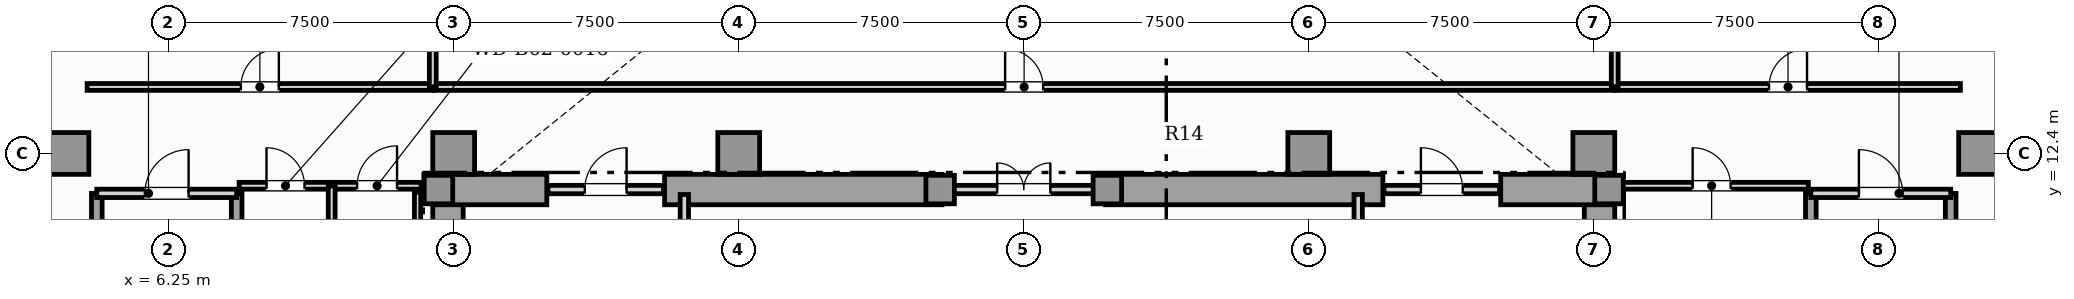
"""IFC4 building model, lengths in metres.
Left out: names, types, materials, properties, quantities, classifications, styles, units other than length and angle.
Written with IfcOpenShell. Run it as: python <this file> out.ifc"""

import sys

from ifc_helpers import new_model, si_unit, direction, frame, frame_2d, origin, origin_2d, place, context, subcontext, project, spatial, rectangle, extrude, element, fill, save


model = new_model("IFC4")
c1 = context("Model", 3, precision=1e-05, world=origin(), true_north=direction((0.0, 1.0)))
c2 = subcontext(c1, "Body", "Model", "MODEL_VIEW")
j1 = project(units=[si_unit("LENGTHUNIT", "METRE"), si_unit("PLANEANGLEUNIT", "RADIAN")], contexts=[c1])
p1 = place(None, origin())
s1 = spatial("IfcSite", under=j1, at=p1, CompositionType="ELEMENT")
p2 = place(p1, origin())
s2 = spatial("IfcBuilding", under=s1, at=p2, CompositionType="ELEMENT")
p3 = place(p2, frame((0.0, 0.0, -10.8)))
s3 = spatial("IfcBuildingStorey", under=s2, at=p3, CompositionType="ELEMENT", Elevation=-10.8)
for number, where, z_axis, x_axis in (
    (1, (13.6, 0.92, 0.0), (0.0, 0.0, 1.0), (0.0, 1.0, 0.0)),
    (2, (43.9, 0.92, 0.0), (0.0, 0.0, 1.0), (0.0, 1.0, 0.0)),
):
    element("IfcWall", number, at=place(p3, frame(where, z_axis=z_axis, x_axis=x_axis)), inside=s3, PredefinedType="SHEAR", context=c2, shape_type="SweptSolid", body=[
        extrude(rectangle(XDim=10.53, YDim=0.8, at=frame_2d((5.265, 0.0))), origin(), (0.0, 0.0, 1.0), 5.05),
    ])
p4 = place(p3, frame((13.25, 11.45, 0.0), z_axis=(0.0, 0.0, 1.0), x_axis=(1.0, 0.0, 0.0)))
e3 = element("IfcWall", 3, at=p4, inside=s3, PredefinedType="SHEAR", context=c2, shape_type="SweptSolid", body=[
    extrude(rectangle(XDim=2.95, YDim=0.8, at=frame_2d((1.475, 0.0))), origin(), (0.0, 0.0, 1.0), 5.05),
])
for number, where, z_axis, x_axis in (
    (4, (19.3, 11.45, 0.0), (0.0, 0.0, 1.0), (1.0, 0.0, 0.0)),
    (5, (30.9, 11.45, 0.0), (0.0, 0.0, 1.0), (1.0, 0.0, 0.0)),
):
    element("IfcWall", number, at=place(p3, frame(where, z_axis=z_axis, x_axis=x_axis)), inside=s3, PredefinedType="SHEAR", context=c2, shape_type="SweptSolid", body=[
        extrude(rectangle(XDim=7.3, YDim=0.8, at=frame_2d((3.65, 0.0))), origin(), (0.0, 0.0, 1.0), 5.05),
    ])
p5 = place(p3, frame((41.3, 11.45, 0.0), z_axis=(0.0, 0.0, 1.0), x_axis=(1.0, 0.0, 0.0)))
e6 = element("IfcWall", 6, at=p5, inside=s3, PredefinedType="SHEAR", context=c2, shape_type="SweptSolid", body=[
    extrude(rectangle(XDim=2.95, YDim=0.8, at=frame_2d((1.475, 0.0))), origin(), (0.0, 0.0, 1.0), 5.05),
])
for number, where, z_axis, x_axis in (
    (7, (13.35, 11.45, 0.0), (0.0, 0.0, 1.0), (1.0, 0.0, 0.0)),
    (8, (44.15, 11.45, 0.0), (0.0, 0.0, 1.0), (1.0, 0.0, 0.0)),
    (9, (26.55, 11.45, 0.0), (0.0, 0.0, 1.0), (1.0, 0.0, 0.0)),
    (10, (30.95, 11.45, 0.0), (0.0, 0.0, 1.0), (1.0, 0.0, 0.0)),
):
    element("IfcColumn", number, at=place(p3, frame(where, z_axis=z_axis, x_axis=x_axis)), inside=s3, PredefinedType="COLUMN", context=c2, shape_type="SweptSolid", body=[
        extrude(rectangle(XDim=0.75, YDim=0.75, at=origin_2d()), origin(), (0.0, 0.0, 1.0), 5.4),
    ])
for number, where, z_axis, x_axis in (
    (11, (3.6, 12.4, 0.0), (0.0, 0.0, 1.0), (1.0, 0.0, 0.0)),
    (12, (13.75, 12.4, 0.0), (0.0, 0.0, 1.0), (1.0, 0.0, 0.0)),
    (13, (43.75, 12.4, 0.0), (0.0, 0.0, 1.0), (1.0, 0.0, 0.0)),
    (14, (53.9, 12.4, 0.0), (0.0, 0.0, 1.0), (1.0, 0.0, 0.0)),
    (15, (21.25, 12.4, 0.0), (0.0, 0.0, 1.0), (1.0, 0.0, 0.0)),
    (16, (36.25, 12.4, 0.0), (0.0, 0.0, 1.0), (1.0, 0.0, 0.0)),
):
    element("IfcColumn", number, at=place(p3, frame(where, z_axis=z_axis, x_axis=x_axis)), inside=s3, PredefinedType="COLUMN", context=c2, shape_type="SweptSolid", body=[
        extrude(rectangle(XDim=1.1, YDim=1.1, at=origin_2d()), origin(), (0.0, 0.0, 1.0), 5.4),
    ])
for number, where, z_axis, x_axis in (
    (17, (4.36, 3.56, 0.0), (0.0, 0.0, 1.0), (0.0, 1.0, 0.0)),
    (18, (8.04, 3.56, 0.0), (0.0, 0.0, 1.0), (0.0, 1.0, 0.0)),
):
    element("IfcWall", number, at=place(p3, frame(where, z_axis=z_axis, x_axis=x_axis)), inside=s3, PredefinedType="SHEAR", context=c2, shape_type="SweptSolid", body=[
        extrude(rectangle(XDim=7.79, YDim=0.28, at=frame_2d((3.895, 0.0))), origin(), (0.0, 0.0, 1.0), 5.05),
    ])
p6 = place(p3, frame((4.36, 11.35, 0.0), z_axis=(0.0, 0.0, 1.0), x_axis=(1.0, 0.0, 0.0)))
e19 = element("IfcWall", 19, at=p6, inside=s3, PredefinedType="SOLIDWALL", context=c2, shape_type="SweptSolid", body=[
    extrude(rectangle(XDim=3.68, YDim=0.22, at=frame_2d((1.84, 0.0))), origin(), (0.0, 0.0, 1.0), 5.05),
])
p7 = place(p6, frame((1.265, 0.0, 0.0)))
e20 = element("IfcOpeningElement", 20, at=p7, cuts=e19, PredefinedType="OPENING", context=c2, shape_type="SweptSolid", body=[
    extrude(rectangle(XDim=1.15, YDim=2.2, at=frame_2d((0.575, 1.1))), frame((0.0, 0.12, 0.0), z_axis=(0.0, -1.0, 0.0), x_axis=(1.0, 0.0, 0.0)), (0.0, 0.0, 1.0), 0.24),
])
for number, where, z_axis, x_axis in (
    (21, (49.46, 3.56, 0.0), (0.0, 0.0, 1.0), (0.0, 1.0, 0.0)),
    (22, (53.14, 3.56, 0.0), (0.0, 0.0, 1.0), (0.0, 1.0, 0.0)),
):
    element("IfcWall", number, at=place(p3, frame(where, z_axis=z_axis, x_axis=x_axis)), inside=s3, PredefinedType="SHEAR", context=c2, shape_type="SweptSolid", body=[
        extrude(rectangle(XDim=7.79, YDim=0.28, at=frame_2d((3.895, 0.0))), origin(), (0.0, 0.0, 1.0), 5.05),
    ])
p8 = place(p3, frame((49.46, 11.35, 0.0), z_axis=(0.0, 0.0, 1.0), x_axis=(1.0, 0.0, 0.0)))
e23 = element("IfcWall", 23, at=p8, inside=s3, PredefinedType="SOLIDWALL", context=c2, shape_type="SweptSolid", body=[
    extrude(rectangle(XDim=3.68, YDim=0.22, at=frame_2d((1.84, 0.0))), origin(), (0.0, 0.0, 1.0), 5.05),
])
p9 = place(p8, frame((1.265, 0.0, 0.0)))
e24 = element("IfcOpeningElement", 24, at=p9, cuts=e23, PredefinedType="OPENING", context=c2, shape_type="SweptSolid", body=[
    extrude(rectangle(XDim=1.15, YDim=2.2, at=frame_2d((0.575, 1.1))), frame((0.0, 0.12, 0.0), z_axis=(0.0, -1.0, 0.0), x_axis=(1.0, 0.0, 0.0)), (0.0, 0.0, 1.0), 0.24),
])
p10 = place(p3, frame((19.82, 8.52, 0.0), z_axis=(0.0, 0.0, 1.0), x_axis=(0.0, 1.0, 0.0)))
e25 = element("IfcWall", 25, at=p10, inside=s3, PredefinedType="SOLIDWALL", context=c2, shape_type="SweptSolid", body=[
    extrude(rectangle(XDim=2.8, YDim=0.22, at=frame_2d((1.4, 0.0))), origin(), (0.0, 0.0, 1.0), 4.506),
])
p11 = place(p10, frame((0.85, 0.0, 0.0)))
e26 = element("IfcOpeningElement", 26, at=p11, cuts=e25, PredefinedType="OPENING", context=c2, shape_type="SweptSolid", body=[
    extrude(rectangle(XDim=1.1, YDim=2.2, at=frame_2d((0.55, 1.1))), frame((0.0, 0.12, 0.0), z_axis=(0.0, -1.0, 0.0), x_axis=(1.0, 0.0, 0.0)), (0.0, 0.0, 1.0), 0.24),
])
p12 = place(p3, frame((37.55, 8.52, 0.0), z_axis=(0.0, 0.0, 1.0), x_axis=(0.0, 1.0, 0.0)))
e27 = element("IfcWall", 27, at=p12, inside=s3, PredefinedType="SOLIDWALL", context=c2, shape_type="SweptSolid", body=[
    extrude(rectangle(XDim=2.8, YDim=0.22, at=frame_2d((1.4, 0.0))), origin(), (0.0, 0.0, 1.0), 4.506),
])
p13 = place(p12, frame((0.85, 0.0, 0.0)))
e28 = element("IfcOpeningElement", 28, at=p13, cuts=e27, PredefinedType="OPENING", context=c2, shape_type="SweptSolid", body=[
    extrude(rectangle(XDim=1.1, YDim=2.2, at=frame_2d((0.55, 1.1))), frame((0.0, 0.12, 0.0), z_axis=(0.0, -1.0, 0.0), x_axis=(1.0, 0.0, 0.0)), (0.0, 0.0, 1.0), 0.24),
])
p14 = place(p3, frame((16.23, 11.45, 0.0), z_axis=(0.0, 0.0, 1.0), x_axis=(1.0, 0.0, 0.0)))
e29 = element("IfcWall", 29, at=p14, inside=s3, PredefinedType="SOLIDWALL", context=c2, shape_type="SweptSolid", body=[
    extrude(rectangle(XDim=3.04, YDim=0.22, at=frame_2d((1.52, 0.0))), origin(), (0.0, 0.0, 1.0), 5.05),
])
p15 = place(p14, frame((0.97, 0.0, 0.0)))
e30 = element("IfcOpeningElement", 30, at=p15, cuts=e29, PredefinedType="OPENING", context=c2, shape_type="SweptSolid", body=[
    extrude(rectangle(XDim=1.1, YDim=2.2, at=frame_2d((0.55, 1.1))), frame((0.0, 0.12, 0.0), z_axis=(0.0, -1.0, 0.0), x_axis=(1.0, 0.0, 0.0)), (0.0, 0.0, 1.0), 0.24),
])
p16 = place(p3, frame((26.63, 11.45, 0.0), z_axis=(0.0, 0.0, 1.0), x_axis=(1.0, 0.0, 0.0)))
e31 = element("IfcWall", 31, at=p16, inside=s3, PredefinedType="SOLIDWALL", context=c2, shape_type="SweptSolid", body=[
    extrude(rectangle(XDim=4.24, YDim=0.22, at=frame_2d((2.12, 0.0))), origin(), (0.0, 0.0, 1.0), 5.05),
])
p17 = place(p16, frame((1.42, 0.0, 0.0)))
e32 = element("IfcOpeningElement", 32, at=p17, cuts=e31, PredefinedType="OPENING", context=c2, shape_type="SweptSolid", body=[
    extrude(rectangle(XDim=1.4, YDim=2.2, at=frame_2d((0.7, 1.1))), frame((0.0, 0.12, 0.0), z_axis=(0.0, -1.0, 0.0), x_axis=(1.0, 0.0, 0.0)), (0.0, 0.0, 1.0), 0.24),
])
p18 = place(p3, frame((38.23, 11.45, 0.0), z_axis=(0.0, 0.0, 1.0), x_axis=(1.0, 0.0, 0.0)))
e33 = element("IfcWall", 33, at=p18, inside=s3, PredefinedType="SOLIDWALL", context=c2, shape_type="SweptSolid", body=[
    extrude(rectangle(XDim=3.04, YDim=0.22, at=frame_2d((1.52, 0.0))), origin(), (0.0, 0.0, 1.0), 5.05),
])
p19 = place(p18, frame((0.97, 0.0, 0.0)))
e34 = element("IfcOpeningElement", 34, at=p19, cuts=e33, PredefinedType="OPENING", context=c2, shape_type="SweptSolid", body=[
    extrude(rectangle(XDim=1.1, YDim=2.2, at=frame_2d((0.55, 1.1))), frame((0.0, 0.12, 0.0), z_axis=(0.0, -1.0, 0.0), x_axis=(1.0, 0.0, 0.0)), (0.0, 0.0, 1.0), 0.24),
])
p20 = place(p3, frame((4.105, 14.15, 0.0), z_axis=(0.0, 0.0, 1.0), x_axis=(1.0, 0.0, 0.0)))
e35 = element("IfcWall", 35, at=p20, inside=s3, PredefinedType="PARTITIONING", context=c2, shape_type="SweptSolid", body=[
    extrude(rectangle(XDim=9.09, YDim=0.18, at=frame_2d((4.545, 0.0))), origin(), (0.0, 0.0, 1.0), 5.05),
])
p21 = place(p20, frame((4.045, 0.0, 0.0)))
e36 = element("IfcOpeningElement", 36, at=p21, cuts=e35, PredefinedType="OPENING", context=c2, shape_type="SweptSolid", body=[
    extrude(rectangle(XDim=1.0, YDim=2.15, at=frame_2d((0.5, 1.075))), frame((0.0, 0.1, 0.0), z_axis=(0.0, -1.0, 0.0), x_axis=(1.0, 0.0, 0.0)), (0.0, 0.0, 1.0), 0.2),
])
p22 = place(p3, frame((13.225, 14.15, 0.0), z_axis=(0.0, 0.0, 1.0), x_axis=(1.0, 0.0, 0.0)))
e37 = element("IfcWall", 37, at=p22, inside=s3, PredefinedType="PARTITIONING", context=c2, shape_type="SweptSolid", body=[
    extrude(rectangle(XDim=31.07, YDim=0.18, at=frame_2d((15.535, 0.0))), origin(), (0.0, 0.0, 1.0), 5.05),
])
p23 = place(p22, frame((15.035, 0.0, 0.0)))
e38 = element("IfcOpeningElement", 38, at=p23, cuts=e37, PredefinedType="OPENING", context=c2, shape_type="SweptSolid", body=[
    extrude(rectangle(XDim=1.0, YDim=2.15, at=frame_2d((0.5, 1.075))), frame((0.0, 0.1, 0.0), z_axis=(0.0, -1.0, 0.0), x_axis=(1.0, 0.0, 0.0)), (0.0, 0.0, 1.0), 0.2),
])
p24 = place(p3, frame((44.325, 14.15, 0.0), z_axis=(0.0, 0.0, 1.0), x_axis=(1.0, 0.0, 0.0)))
e39 = element("IfcWall", 39, at=p24, inside=s3, PredefinedType="PARTITIONING", context=c2, shape_type="SweptSolid", body=[
    extrude(rectangle(XDim=9.07, YDim=0.18, at=frame_2d((4.535, 0.0))), origin(), (0.0, 0.0, 1.0), 5.05),
])
p25 = place(p24, frame((4.035, 0.0, 0.0)))
e40 = element("IfcOpeningElement", 40, at=p25, cuts=e39, PredefinedType="OPENING", context=c2, shape_type="SweptSolid", body=[
    extrude(rectangle(XDim=1.0, YDim=2.15, at=frame_2d((0.5, 1.075))), frame((0.0, 0.1, 0.0), z_axis=(0.0, -1.0, 0.0), x_axis=(1.0, 0.0, 0.0)), (0.0, 0.0, 1.0), 0.2),
])
p26 = place(p3, frame((8.105, 11.55, 0.0), z_axis=(0.0, 0.0, 1.0), x_axis=(1.0, 0.0, 0.0)))
e41 = element("IfcWall", 41, at=p26, inside=s3, PredefinedType="PARTITIONING", context=c2, shape_type="SweptSolid", body=[
    extrude(rectangle(XDim=2.44, YDim=0.18, at=frame_2d((1.22, 0.0))), origin(), (0.0, 0.0, 1.0), 5.05),
])
p27 = place(p26, frame((0.72, 0.0, 0.0)))
e42 = element("IfcOpeningElement", 42, at=p27, cuts=e41, PredefinedType="OPENING", context=c2, shape_type="SweptSolid", body=[
    extrude(rectangle(XDim=1.0, YDim=2.15, at=frame_2d((0.5, 1.075))), frame((0.0, 0.1, 0.0), z_axis=(0.0, -1.0, 0.0), x_axis=(1.0, 0.0, 0.0)), (0.0, 0.0, 1.0), 0.2),
])
p28 = place(p3, frame((10.575, 11.55, 0.0), z_axis=(0.0, 0.0, 1.0), x_axis=(1.0, 0.0, 0.0)))
e43 = element("IfcWall", 43, at=p28, inside=s3, PredefinedType="PARTITIONING", context=c2, shape_type="SweptSolid", body=[
    extrude(rectangle(XDim=2.32, YDim=0.18, at=frame_2d((1.16, 0.0))), origin(), (0.0, 0.0, 1.0), 5.05),
])
p29 = place(p28, frame((0.635, 0.0, 0.0)))
e44 = element("IfcOpeningElement", 44, at=p29, cuts=e43, PredefinedType="OPENING", context=c2, shape_type="SweptSolid", body=[
    extrude(rectangle(XDim=1.05, YDim=2.15, at=frame_2d((0.525, 1.075))), frame((0.0, 0.1, 0.0), z_axis=(0.0, -1.0, 0.0), x_axis=(1.0, 0.0, 0.0)), (0.0, 0.0, 1.0), 0.2),
])
p30 = place(p3, frame((44.305, 11.55, 0.0), z_axis=(0.0, 0.0, 1.0), x_axis=(1.0, 0.0, 0.0)))
e45 = element("IfcWall", 45, at=p30, inside=s3, PredefinedType="PARTITIONING", context=c2, shape_type="SweptSolid", body=[
    extrude(rectangle(XDim=5.09, YDim=0.18, at=frame_2d((2.545, 0.0))), origin(), (0.0, 0.0, 1.0), 5.05),
])
p31 = place(p30, frame((2.045, 0.0, 0.0)))
e46 = element("IfcOpeningElement", 46, at=p31, cuts=e45, PredefinedType="OPENING", context=c2, shape_type="SweptSolid", body=[
    extrude(rectangle(XDim=1.0, YDim=2.15, at=frame_2d((0.5, 1.075))), frame((0.0, 0.1, 0.0), z_axis=(0.0, -1.0, 0.0), x_axis=(1.0, 0.0, 0.0)), (0.0, 0.0, 1.0), 0.2),
])
p32 = place(p3, frame((13.2, 14.155, 0.0), z_axis=(0.0, 0.0, 1.0), x_axis=(0.0, 1.0, 0.0)))
e47 = element("IfcWall", 47, at=p32, inside=s3, PredefinedType="PARTITIONING", context=c2, shape_type="SweptSolid", body=[
    extrude(rectangle(XDim=31.74, YDim=0.18, at=frame_2d((15.87, 0.0))), origin(), (0.0, 0.0, 1.0), 5.05),
])
p33 = place(p32, frame((15.37, 0.0, 0.0)))
e48 = element("IfcOpeningElement", 48, at=p33, cuts=e47, PredefinedType="OPENING", context=c2, shape_type="SweptSolid", body=[
    extrude(rectangle(XDim=1.0, YDim=2.15, at=frame_2d((0.5, 1.075))), frame((0.0, 0.1, 0.0), z_axis=(0.0, -1.0, 0.0), x_axis=(1.0, 0.0, 0.0)), (0.0, 0.0, 1.0), 0.2),
])
p34 = place(p3, frame((44.3, 14.155, 0.0), z_axis=(0.0, 0.0, 1.0), x_axis=(0.0, 1.0, 0.0)))
e49 = element("IfcWall", 49, at=p34, inside=s3, PredefinedType="PARTITIONING", context=c2, shape_type="SweptSolid", body=[
    extrude(rectangle(XDim=31.74, YDim=0.18, at=frame_2d((15.87, 0.0))), origin(), (0.0, 0.0, 1.0), 5.05),
])
p35 = place(p34, frame((15.37, 0.0, 0.0)))
e50 = element("IfcOpeningElement", 50, at=p35, cuts=e49, PredefinedType="OPENING", context=c2, shape_type="SweptSolid", body=[
    extrude(rectangle(XDim=1.0, YDim=2.15, at=frame_2d((0.5, 1.075))), frame((0.0, 0.1, 0.0), z_axis=(0.0, -1.0, 0.0), x_axis=(1.0, 0.0, 0.0)), (0.0, 0.0, 1.0), 0.2),
])
p36 = place(p3, frame((10.54, 6.705, 0.0), z_axis=(0.0, 0.0, 1.0), x_axis=(0.0, 1.0, 0.0)))
e51 = element("IfcWall", 51, at=p36, inside=s3, PredefinedType="PARTITIONING", context=c2, shape_type="SweptSolid", body=[
    extrude(rectangle(XDim=4.84, YDim=0.18, at=frame_2d((2.42, 0.0))), origin(), (0.0, 0.0, 1.0), 5.05),
])
p37 = place(p36, frame((1.895, 0.0, 0.0)))
e52 = element("IfcOpeningElement", 52, at=p37, cuts=e51, PredefinedType="OPENING", context=c2, shape_type="SweptSolid", body=[
    extrude(rectangle(XDim=1.05, YDim=2.15, at=frame_2d((0.525, 1.075))), frame((0.0, 0.1, 0.0), z_axis=(0.0, -1.0, 0.0), x_axis=(1.0, 0.0, 0.0)), (0.0, 0.0, 1.0), 0.2),
])
p38 = place(p3, frame((12.8, 6.875, 0.0), z_axis=(0.0, 0.0, 1.0), x_axis=(0.0, 1.0, 0.0)))
e53 = element("IfcWall", 53, at=p38, inside=s3, PredefinedType="PLUMBINGWALL", context=c2, shape_type="SweptSolid", body=[
    extrude(rectangle(XDim=4.51, YDim=0.165, at=frame_2d((2.255, 0.0))), origin(), (0.0, 0.0, 1.0), 5.05),
])
p39 = place(p7, origin())
e54 = element("IfcDoor", 54, at=p39, inside=s3, OperationType="SINGLE_SWING_RIGHT", PredefinedType="DOOR", context=c2, shape_type="SweptSolid", body=[
    extrude(rectangle(XDim=1.15, YDim=2.2, at=frame_2d((0.575, 1.1))), frame((0.0, 0.025, 0.0), z_axis=(0.0, -1.0, 0.0), x_axis=(1.0, 0.0, 0.0)), (0.0, 0.0, 1.0), 0.05),
])
fill(e20, e54)
p40 = place(p9, origin())
e55 = element("IfcDoor", 55, at=p40, inside=s3, OperationType="SINGLE_SWING_LEFT", PredefinedType="DOOR", context=c2, shape_type="SweptSolid", body=[
    extrude(rectangle(XDim=1.15, YDim=2.2, at=frame_2d((0.575, 1.1))), frame((0.0, 0.025, 0.0), z_axis=(0.0, -1.0, 0.0), x_axis=(1.0, 0.0, 0.0)), (0.0, 0.0, 1.0), 0.05),
])
fill(e24, e55)
p41 = place(p15, origin())
e56 = element("IfcDoor", 56, at=p41, inside=s3, OperationType="SINGLE_SWING_RIGHT", PredefinedType="DOOR", context=c2, shape_type="SweptSolid", body=[
    extrude(rectangle(XDim=1.1, YDim=2.2, at=frame_2d((0.55, 1.1))), frame((0.0, 0.025, 0.0), z_axis=(0.0, -1.0, 0.0), x_axis=(1.0, 0.0, 0.0)), (0.0, 0.0, 1.0), 0.05),
])
fill(e30, e56)
p42 = place(p17, origin())
e57 = element("IfcDoor", 57, at=p42, inside=s3, OperationType="DOUBLE_DOOR_SINGLE_SWING", PredefinedType="DOOR", context=c2, shape_type="SweptSolid", body=[
    extrude(rectangle(XDim=1.4, YDim=2.2, at=frame_2d((0.7, 1.1))), frame((0.0, 0.025, 0.0), z_axis=(0.0, -1.0, 0.0), x_axis=(1.0, 0.0, 0.0)), (0.0, 0.0, 1.0), 0.05),
])
fill(e32, e57)
p43 = place(p19, origin())
e58 = element("IfcDoor", 58, at=p43, inside=s3, OperationType="SINGLE_SWING_LEFT", PredefinedType="DOOR", context=c2, shape_type="SweptSolid", body=[
    extrude(rectangle(XDim=1.1, YDim=2.2, at=frame_2d((0.55, 1.1))), frame((0.0, 0.025, 0.0), z_axis=(0.0, -1.0, 0.0), x_axis=(1.0, 0.0, 0.0)), (0.0, 0.0, 1.0), 0.05),
])
fill(e34, e58)
p44 = place(p21, origin())
e59 = element("IfcDoor", 59, at=p44, inside=s3, OperationType="SINGLE_SWING_RIGHT", PredefinedType="DOOR", context=c2, shape_type="SweptSolid", body=[
    extrude(rectangle(XDim=1.0, YDim=2.15, at=frame_2d((0.5, 1.075))), frame((0.0, 0.025, 0.0), z_axis=(0.0, -1.0, 0.0), x_axis=(1.0, 0.0, 0.0)), (0.0, 0.0, 1.0), 0.05),
])
fill(e36, e59)
p45 = place(p23, origin())
e60 = element("IfcDoor", 60, at=p45, inside=s3, OperationType="SINGLE_SWING_LEFT", PredefinedType="DOOR", context=c2, shape_type="SweptSolid", body=[
    extrude(rectangle(XDim=1.0, YDim=2.15, at=frame_2d((0.5, 1.075))), frame((0.0, 0.025, 0.0), z_axis=(0.0, -1.0, 0.0), x_axis=(1.0, 0.0, 0.0)), (0.0, 0.0, 1.0), 0.05),
])
fill(e38, e60)
p46 = place(p25, origin())
e61 = element("IfcDoor", 61, at=p46, inside=s3, OperationType="SINGLE_SWING_RIGHT", PredefinedType="DOOR", context=c2, shape_type="SweptSolid", body=[
    extrude(rectangle(XDim=1.0, YDim=2.15, at=frame_2d((0.5, 1.075))), frame((0.0, 0.025, 0.0), z_axis=(0.0, -1.0, 0.0), x_axis=(1.0, 0.0, 0.0)), (0.0, 0.0, 1.0), 0.05),
])
fill(e40, e61)
p47 = place(p27, origin())
e62 = element("IfcDoor", 62, at=p47, inside=s3, OperationType="SINGLE_SWING_LEFT", PredefinedType="DOOR", context=c2, shape_type="SweptSolid", body=[
    extrude(rectangle(XDim=1.0, YDim=2.15, at=frame_2d((0.5, 1.075))), frame((0.0, 0.025, 0.0), z_axis=(0.0, -1.0, 0.0), x_axis=(1.0, 0.0, 0.0)), (0.0, 0.0, 1.0), 0.05),
])
fill(e42, e62)
p48 = place(p29, origin())
e63 = element("IfcDoor", 63, at=p48, inside=s3, OperationType="SINGLE_SWING_RIGHT", PredefinedType="DOOR", context=c2, shape_type="SweptSolid", body=[
    extrude(rectangle(XDim=1.05, YDim=2.15, at=frame_2d((0.525, 1.075))), frame((0.0, 0.025, 0.0), z_axis=(0.0, -1.0, 0.0), x_axis=(1.0, 0.0, 0.0)), (0.0, 0.0, 1.0), 0.05),
])
fill(e44, e63)
p49 = place(p31, origin())
e64 = element("IfcDoor", 64, at=p49, inside=s3, OperationType="SINGLE_SWING_LEFT", PredefinedType="DOOR", context=c2, shape_type="SweptSolid", body=[
    extrude(rectangle(XDim=1.0, YDim=2.15, at=frame_2d((0.5, 1.075))), frame((0.0, 0.025, 0.0), z_axis=(0.0, -1.0, 0.0), x_axis=(1.0, 0.0, 0.0)), (0.0, 0.0, 1.0), 0.05),
])
fill(e46, e64)
save(model, sys.argv[1])
